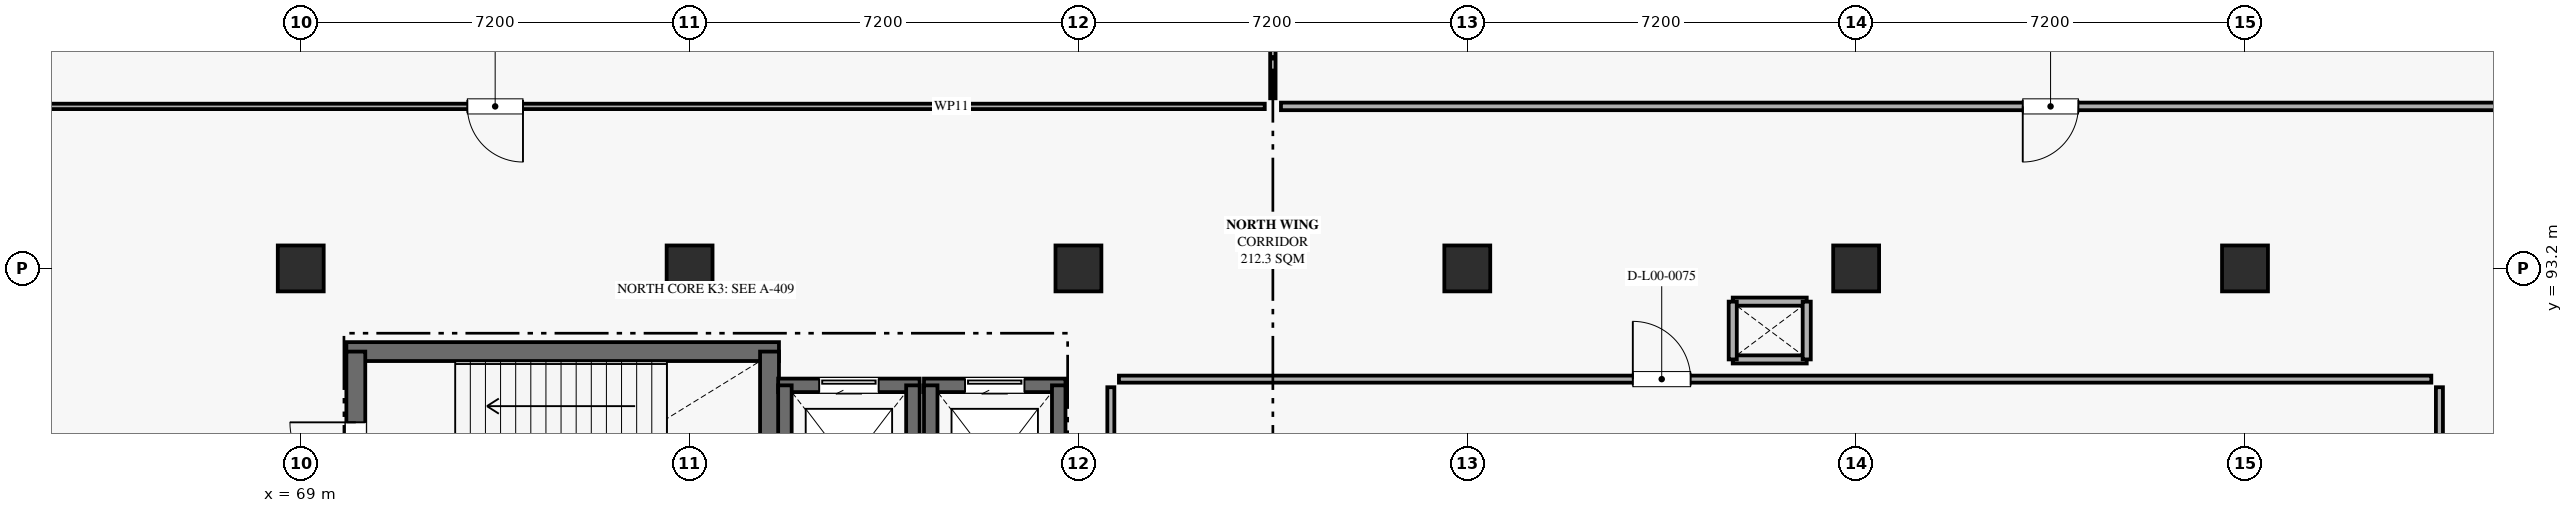
"""IFC4 building model, lengths in metres.
Left out: names, types, materials, properties, quantities, classifications, styles, units other than length and angle.
Written with IfcOpenShell. Run it as: python <this file> out.ifc"""

import sys

from ifc_helpers import new_model, si_unit, direction, frame, frame_2d, origin, origin_2d, place, context, subcontext, project, spatial, rectangle, extrude, element, fill, save


model = new_model("IFC4")
c1 = context("Model", 3, precision=1e-05, world=origin(), true_north=direction((0.0, 1.0)))
c2 = subcontext(c1, "Body", "Model", "MODEL_VIEW")
j1 = project(units=[si_unit("LENGTHUNIT", "METRE"), si_unit("PLANEANGLEUNIT", "RADIAN")], contexts=[c1])
p1 = place(None, origin())
s1 = spatial("IfcSite", under=j1, at=p1, CompositionType="ELEMENT")
p2 = place(p1, origin())
s2 = spatial("IfcBuilding", under=s1, at=p2, CompositionType="ELEMENT")
p3 = place(p2, origin())
s3 = spatial("IfcBuildingStorey", under=s2, at=p3, CompositionType="ELEMENT", Elevation=0.0)
for number, where, z_axis, x_axis in (
    (1, (69.0, 93.2, 0.0), (0.0, 0.0, 1.0), (1.0, 0.0, 0.0)),
    (2, (76.2, 93.2, 0.0), (0.0, 0.0, 1.0), (1.0, 0.0, 0.0)),
    (3, (83.4, 93.2, 0.0), (0.0, 0.0, 1.0), (1.0, 0.0, 0.0)),
    (4, (90.6, 93.2, 0.0), (0.0, 0.0, 1.0), (1.0, 0.0, 0.0)),
    (5, (97.8, 93.2, 0.0), (0.0, 0.0, 1.0), (1.0, 0.0, 0.0)),
    (6, (105.0, 93.2, 0.0), (0.0, 0.0, 1.0), (1.0, 0.0, 0.0)),
):
    element("IfcColumn", number, at=place(p3, frame(where, z_axis=z_axis, x_axis=x_axis)), inside=s3, PredefinedType="COLUMN", context=c2, shape_type="SweptSolid", body=[
        extrude(rectangle(XDim=0.85, YDim=0.85, at=origin_2d()), origin(), (0.0, 0.0, 1.0), 5.4),
    ])
p4 = place(p3, frame((69.845, 91.66, 0.0), z_axis=(0.0, 0.0, 1.0), x_axis=(1.0, 0.0, 0.0)))
e7 = element("IfcWall", 7, at=p4, inside=s3, PredefinedType="SHEAR", context=c2, shape_type="SweptSolid", body=[
    extrude(rectangle(XDim=8.01, YDim=0.35, at=frame_2d((4.005, 0.0))), origin(), (0.0, 0.0, 1.0), 5.13),
])
p5 = place(p3, frame((70.02, 87.82, 0.0), z_axis=(0.0, 0.0, 1.0), x_axis=(0.0, 1.0, 0.0)))
e8 = element("IfcWall", 8, at=p5, inside=s3, PredefinedType="SHEAR", context=c2, shape_type="SweptSolid", body=[
    extrude(rectangle(XDim=3.84, YDim=0.35, at=frame_2d((1.92, 0.0))), origin(), (0.0, 0.0, 1.0), 5.13),
])
p6 = place(p5, frame((1.31, 0.0, 0.0)))
e9 = element("IfcOpeningElement", 9, at=p6, cuts=e8, PredefinedType="OPENING", context=c2, shape_type="SweptSolid", body=[
    extrude(rectangle(XDim=1.22, YDim=2.06, at=frame_2d((0.61, 1.03))), frame((0.0, 0.185, 0.0), z_axis=(0.0, -1.0, 0.0), x_axis=(1.0, 0.0, 0.0)), (0.0, 0.0, 1.0), 0.37),
])
p7 = place(p3, frame((77.68, 91.66, 0.0), z_axis=(0.0, 0.0, 1.0), x_axis=(0.0, -1.0, 0.0)))
e10 = element("IfcWall", 10, at=p7, inside=s3, PredefinedType="SHEAR", context=c2, shape_type="SweptSolid", body=[
    extrude(rectangle(XDim=3.84, YDim=0.35, at=frame_2d((1.92, 0.0))), origin(), (0.0, 0.0, 1.0), 5.13),
])
for number, where, z_axis, x_axis in (
    (11, (96.885, 91.515, 0.0), (0.0, 0.0, 1.0), (-1.0, 0.0, 0.0)),
    (12, (95.515, 92.585, 0.0), (0.0, 0.0, 1.0), (1.0, 0.0, 0.0)),
):
    element("IfcWall", number, at=place(p3, frame(where, z_axis=z_axis, x_axis=x_axis)), inside=s3, PredefinedType="PARTITIONING", context=c2, shape_type="SweptSolid", body=[
        extrude(rectangle(XDim=1.37, YDim=0.15, at=frame_2d((0.685, 0.0))), origin(), (0.0, 0.0, 1.0), 3.88),
    ])
for number, where, z_axis, x_axis in (
    (13, (95.515, 91.515, 0.0), (0.0, 0.0, 1.0), (0.0, 1.0, 0.0)),
    (14, (96.885, 92.585, 0.0), (0.0, 0.0, 1.0), (0.0, -1.0, 0.0)),
):
    element("IfcWall", number, at=place(p3, frame(where, z_axis=z_axis, x_axis=x_axis)), inside=s3, PredefinedType="PARTITIONING", context=c2, shape_type="SweptSolid", body=[
        extrude(rectangle(XDim=1.07, YDim=0.15, at=frame_2d((0.535, 0.0))), origin(), (0.0, 0.0, 1.0), 3.88),
    ])
p8 = place(p3, frame((77.84, 91.035, 0.0), z_axis=(0.0, 0.0, 1.0), x_axis=(1.0, 0.0, 0.0)))
e15 = element("IfcWall", 15, at=p8, inside=s3, PredefinedType="SHEAR", context=c2, shape_type="SweptSolid", body=[
    extrude(rectangle(XDim=2.62, YDim=0.25, at=frame_2d((1.31, 0.0))), origin(), (0.0, 0.0, 1.0), 5.13),
])
p9 = place(p8, frame((0.76, 0.0, 0.0)))
e16 = element("IfcOpeningElement", 16, at=p9, cuts=e15, PredefinedType="OPENING", context=c2, shape_type="SweptSolid", body=[
    extrude(rectangle(XDim=1.1, YDim=2.2, at=frame_2d((0.55, 1.1))), frame((0.0, 0.135, 0.0), z_axis=(0.0, -1.0, 0.0), x_axis=(1.0, 0.0, 0.0)), (0.0, 0.0, 1.0), 0.27),
])
for number, where, z_axis, x_axis in (
    (17, (77.965, 88.065, 0.0), (0.0, 0.0, 1.0), (0.0, 1.0, 0.0)),
    (18, (80.335, 91.035, 0.0), (0.0, 0.0, 1.0), (0.0, -1.0, 0.0)),
):
    element("IfcWall", number, at=place(p3, frame(where, z_axis=z_axis, x_axis=x_axis)), inside=s3, PredefinedType="SHEAR", context=c2, shape_type="SweptSolid", body=[
        extrude(rectangle(XDim=2.97, YDim=0.25, at=frame_2d((1.485, 0.0))), origin(), (0.0, 0.0, 1.0), 5.13),
    ])
p10 = place(p3, frame((80.54, 91.035, 0.0), z_axis=(0.0, 0.0, 1.0), x_axis=(1.0, 0.0, 0.0)))
e19 = element("IfcWall", 19, at=p10, inside=s3, PredefinedType="SHEAR", context=c2, shape_type="SweptSolid", body=[
    extrude(rectangle(XDim=2.62, YDim=0.25, at=frame_2d((1.31, 0.0))), origin(), (0.0, 0.0, 1.0), 5.13),
])
p11 = place(p10, frame((0.76, 0.0, 0.0)))
e20 = element("IfcOpeningElement", 20, at=p11, cuts=e19, PredefinedType="OPENING", context=c2, shape_type="SweptSolid", body=[
    extrude(rectangle(XDim=1.1, YDim=2.2, at=frame_2d((0.55, 1.1))), frame((0.0, 0.135, 0.0), z_axis=(0.0, -1.0, 0.0), x_axis=(1.0, 0.0, 0.0)), (0.0, 0.0, 1.0), 0.27),
])
for number, where, z_axis, x_axis in (
    (21, (80.665, 88.065, 0.0), (0.0, 0.0, 1.0), (0.0, 1.0, 0.0)),
    (22, (83.035, 91.035, 0.0), (0.0, 0.0, 1.0), (0.0, -1.0, 0.0)),
):
    element("IfcWall", number, at=place(p3, frame(where, z_axis=z_axis, x_axis=x_axis)), inside=s3, PredefinedType="SHEAR", context=c2, shape_type="SweptSolid", body=[
        extrude(rectangle(XDim=2.97, YDim=0.25, at=frame_2d((1.485, 0.0))), origin(), (0.0, 0.0, 1.0), 5.13),
    ])
p12 = place(p3, frame((86.85, 96.2, 0.0), z_axis=(0.0, 0.0, 1.0), x_axis=(-1.0, 0.0, 0.0)))
e23 = element("IfcWall", 23, at=p12, inside=s3, PredefinedType="PARTITIONING", context=c2, shape_type="SweptSolid", body=[
    extrude(rectangle(XDim=24.7, YDim=0.1, at=frame_2d((12.35, 0.0))), origin(), (0.0, 0.0, 1.0), 3.88),
])
p13 = place(p12, frame((13.735, 0.0, 0.0)))
e24 = element("IfcOpeningElement", 24, at=p13, cuts=e23, PredefinedType="OPENING", context=c2, shape_type="SweptSolid", body=[
    extrude(rectangle(XDim=1.03, YDim=2.16, at=frame_2d((0.515, 1.08))), frame((0.0, 0.06, 0.0), z_axis=(0.0, -1.0, 0.0), x_axis=(1.0, 0.0, 0.0)), (0.0, 0.0, 1.0), 0.12),
])
p14 = place(p3, frame((87.0, 114.2, 0.0), z_axis=(0.0, 0.0, 1.0), x_axis=(0.0, -1.0, 0.0)))
e25 = element("IfcWall", 25, at=p14, inside=s3, PredefinedType="PARTITIONING", context=c2, shape_type="SweptSolid", body=[
    extrude(rectangle(XDim=17.85, YDim=0.1, at=frame_2d((8.925, 0.0))), origin(), (0.0, 0.0, 1.0), 3.88),
])
p15 = place(p3, frame((111.85, 96.2, 0.0), z_axis=(0.0, 0.0, 1.0), x_axis=(-1.0, 0.0, 0.0)))
e26 = element("IfcWall", 26, at=p15, inside=s3, PredefinedType="PARTITIONING", context=c2, shape_type="SweptSolid", body=[
    extrude(rectangle(XDim=24.7, YDim=0.14, at=frame_2d((12.35, 0.0))), origin(), (0.0, 0.0, 1.0), 3.88),
])
p16 = place(p15, frame((9.935, 0.0, 0.0)))
e27 = element("IfcOpeningElement", 27, at=p16, cuts=e26, PredefinedType="OPENING", context=c2, shape_type="SweptSolid", body=[
    extrude(rectangle(XDim=1.03, YDim=2.22, at=frame_2d((0.515, 1.11))), frame((0.0, 0.08, 0.0), z_axis=(0.0, -1.0, 0.0), x_axis=(1.0, 0.0, 0.0)), (0.0, 0.0, 1.0), 0.16),
])
p17 = place(p3, frame((84.15, 91.15, 0.0), z_axis=(0.0, 0.0, 1.0), x_axis=(1.0, 0.0, 0.0)))
e28 = element("IfcWall", 28, at=p17, inside=s3, PredefinedType="PARTITIONING", context=c2, shape_type="SweptSolid", body=[
    extrude(rectangle(XDim=24.3, YDim=0.13, at=frame_2d((12.15, 0.0))), origin(), (0.0, 0.0, 1.0), 3.88),
])
p18 = place(p17, frame((9.515, 0.0, 0.0)))
e29 = element("IfcOpeningElement", 29, at=p18, cuts=e28, PredefinedType="OPENING", context=c2, shape_type="SweptSolid", body=[
    extrude(rectangle(XDim=1.07, YDim=2.05, at=frame_2d((0.535, 1.025))), frame((0.0, 0.075, 0.0), z_axis=(0.0, -1.0, 0.0), x_axis=(1.0, 0.0, 0.0)), (0.0, 0.0, 1.0), 0.15),
])
for number, where, z_axis, x_axis in (
    (30, (84.0, 86.35, 0.0), (0.0, 0.0, 1.0), (0.0, 1.0, 0.0)),
    (31, (108.6, 91.0, 0.0), (0.0, 0.0, 1.0), (0.0, -1.0, 0.0)),
):
    element("IfcWall", number, at=place(p3, frame(where, z_axis=z_axis, x_axis=x_axis)), inside=s3, PredefinedType="PARTITIONING", context=c2, shape_type="SweptSolid", body=[
        extrude(rectangle(XDim=4.65, YDim=0.13, at=frame_2d((2.325, 0.0))), origin(), (0.0, 0.0, 1.0), 3.88),
    ])
p19 = place(p6, origin())
e32 = element("IfcDoor", 32, at=p19, inside=s3, OperationType="SINGLE_SWING_RIGHT", PredefinedType="DOOR", context=c2, shape_type="SweptSolid", body=[
    extrude(rectangle(XDim=1.22, YDim=2.06, at=frame_2d((0.61, 1.03))), frame((0.0, 0.025, 0.0), z_axis=(0.0, -1.0, 0.0), x_axis=(1.0, 0.0, 0.0)), (0.0, 0.0, 1.0), 0.05),
])
fill(e9, e32)
p20 = place(p9, origin())
e33 = element("IfcDoor", 33, at=p20, inside=s3, OperationType="SLIDING_TO_LEFT", PredefinedType="DOOR", context=c2, shape_type="SweptSolid", body=[
    extrude(rectangle(XDim=1.1, YDim=2.2, at=frame_2d((0.55, 1.1))), frame((0.0, 0.025, 0.0), z_axis=(0.0, -1.0, 0.0), x_axis=(1.0, 0.0, 0.0)), (0.0, 0.0, 1.0), 0.05),
])
fill(e16, e33)
p21 = place(p11, origin())
e34 = element("IfcDoor", 34, at=p21, inside=s3, OperationType="SLIDING_TO_LEFT", PredefinedType="DOOR", context=c2, shape_type="SweptSolid", body=[
    extrude(rectangle(XDim=1.1, YDim=2.2, at=frame_2d((0.55, 1.1))), frame((0.0, 0.025, 0.0), z_axis=(0.0, -1.0, 0.0), x_axis=(1.0, 0.0, 0.0)), (0.0, 0.0, 1.0), 0.05),
])
fill(e20, e34)
p22 = place(p13, origin())
e35 = element("IfcDoor", 35, at=p22, inside=s3, OperationType="SINGLE_SWING_LEFT", PredefinedType="DOOR", context=c2, shape_type="SweptSolid", body=[
    extrude(rectangle(XDim=1.03, YDim=2.16, at=frame_2d((0.515, 1.08))), frame((0.0, 0.025, 0.0), z_axis=(0.0, -1.0, 0.0), x_axis=(1.0, 0.0, 0.0)), (0.0, 0.0, 1.0), 0.05),
])
fill(e24, e35)
p23 = place(p16, origin())
e36 = element("IfcDoor", 36, at=p23, inside=s3, OperationType="SINGLE_SWING_RIGHT", PredefinedType="DOOR", context=c2, shape_type="SweptSolid", body=[
    extrude(rectangle(XDim=1.03, YDim=2.22, at=frame_2d((0.515, 1.11))), frame((0.0, 0.025, 0.0), z_axis=(0.0, -1.0, 0.0), x_axis=(1.0, 0.0, 0.0)), (0.0, 0.0, 1.0), 0.05),
])
fill(e27, e36)
p24 = place(p18, origin())
e37 = element("IfcDoor", 37, at=p24, inside=s3, OperationType="SINGLE_SWING_LEFT", PredefinedType="DOOR", context=c2, shape_type="SweptSolid", body=[
    extrude(rectangle(XDim=1.07, YDim=2.05, at=frame_2d((0.535, 1.025))), frame((0.0, 0.025, 0.0), z_axis=(0.0, -1.0, 0.0), x_axis=(1.0, 0.0, 0.0)), (0.0, 0.0, 1.0), 0.05),
])
fill(e29, e37)
save(model, sys.argv[1])
